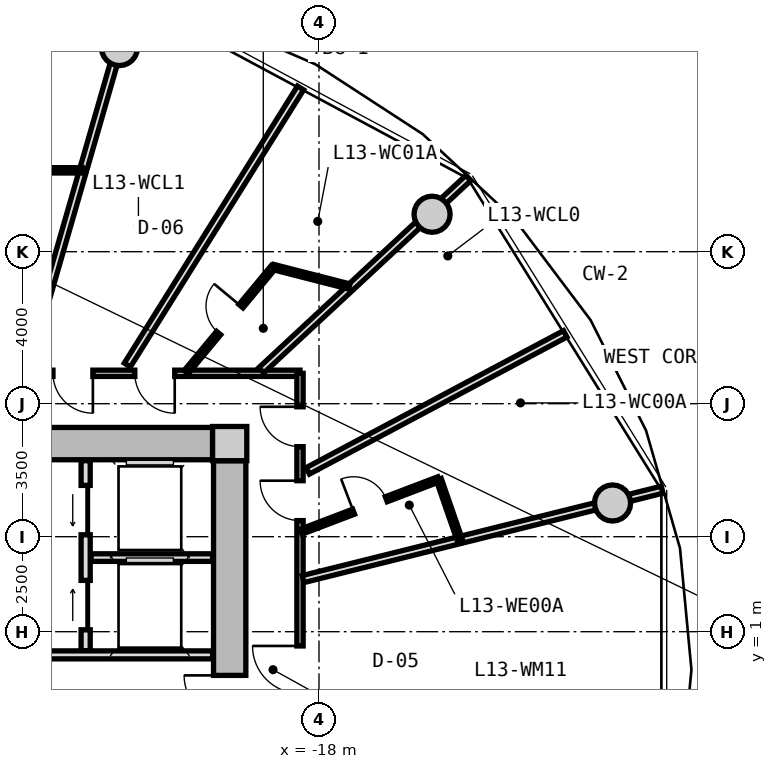
"""IFC4 building model, lengths in metres.
Left out: names, types, materials, properties, quantities, classifications, styles, units other than length and angle.
Written with IfcOpenShell. Run it as: python <this file> out.ifc"""

import sys

from ifc_helpers import new_model, si_unit, direction, frame, frame_2d, origin, origin_2d, place, context, subcontext, project, spatial, rectangle, circle, extrude, source, transform, mapped, element, fill, save


model = new_model("IFC4")
c1 = context("Model", 3, precision=1e-05, world=origin(), true_north=direction((0.0, 1.0)))
c2 = subcontext(c1, "Body", "Model", "MODEL_VIEW")
j1 = project(units=[si_unit("LENGTHUNIT", "METRE"), si_unit("PLANEANGLEUNIT", "RADIAN")], contexts=[c1])
p1 = place(None, origin())
s1 = spatial("IfcSite", under=j1, at=p1, CompositionType="ELEMENT")
p2 = place(p1, origin())
s2 = spatial("IfcBuilding", under=s1, at=p2, CompositionType="ELEMENT")
p3 = place(p2, frame((0.0, 0.0, 46.0)))
s3 = spatial("IfcBuildingStorey", under=s2, at=p3, CompositionType="ELEMENT", Elevation=46.0)
m1 = source(origin(), c2, "Body", "SweptSolid", [
    extrude(rectangle(XDim=0.9, YDim=0.9, at=origin_2d()), origin(), (0.0, 0.0, 1.0), 3.05),
])
p4 = place(p3, frame((-20.35, 5.95, 0.0), z_axis=(0.0, 0.0, 1.0), x_axis=(1.0, 0.0, 0.0)))
e1 = element("IfcColumn", 1, at=p4, inside=s3, PredefinedType="COLUMN", context=c2, shape_type="MappedRepresentation", body=[
    mapped(m1, transform((0.0, 0.0, 0.0), x_axis=(1.0, 0.0, 0.0), y_axis=(0.0, 1.0, 0.0), z_axis=(0.0, 0.0, 1.0), scale=1.0)),
])
m2 = source(origin(), c2, "Body", "SweptSolid", [
    extrude(rectangle(XDim=14.4, YDim=0.85, at=frame_2d((7.2, 0.0))), origin(), (0.0, 0.0, 1.0), 2.79),
])
p5 = place(p3, frame((-35.2, 5.95, 0.0), z_axis=(0.0, 0.0, 1.0), x_axis=(1.0, 0.0, 0.0)))
e2 = element("IfcWall", 2, at=p5, inside=s3, PredefinedType="SHEAR", context=c2, shape_type="MappedRepresentation", body=[
    mapped(m2, transform((0.0, 0.0, 0.0), x_axis=(1.0, 0.0, 0.0), y_axis=(0.0, 1.0, 0.0), z_axis=(0.0, 0.0, 1.0), scale=1.0)),
])
m3 = source(origin(), c2, "Body", "SweptSolid", [
    extrude(rectangle(XDim=11.0, YDim=0.85, at=frame_2d((5.5, 0.0))), origin(), (0.0, 0.0, 1.0), 2.79),
])
p6 = place(p3, frame((-20.35, 5.5, 0.0), z_axis=(0.0, 0.0, 1.0), x_axis=(0.0, -1.0, 0.0)))
e3 = element("IfcWall", 3, at=p6, inside=s3, PredefinedType="SHEAR", context=c2, shape_type="MappedRepresentation", body=[
    mapped(m3, transform((0.0, 0.0, 0.0), x_axis=(1.0, 0.0, 0.0), y_axis=(0.0, 1.0, 0.0), z_axis=(0.0, 0.0, 1.0), scale=1.0)),
])
p7 = place(p6, frame((5.65, 0.0, 0.0)))
e4 = element("IfcOpeningElement", 4, at=p7, cuts=e3, PredefinedType="OPENING", context=c2, shape_type="SweptSolid", body=[
    extrude(rectangle(XDim=1.2, YDim=2.15, at=frame_2d((0.6, 1.075))), frame((0.0, 0.435, 0.0), z_axis=(0.0, -1.0, 0.0), x_axis=(1.0, 0.0, 0.0)), (0.0, 0.0, 1.0), 0.87),
])
m4 = source(origin(), c2, "Body", "SweptSolid", [
    extrude(circle(Radius=0.475, at=origin_2d()), origin(), (0.0, 0.0, 1.0), 3.05),
])
for number, where, z_axis, x_axis in (
    (5, (-10.275, 4.387, 0.0), (0.0, 0.0, 1.0), (1.0, 0.0, 0.0)),
    (6, (-15.025, 11.985, 0.0), (0.0, 0.0, 1.0), (1.0, 0.0, 0.0)),
    (7, (-23.251, 16.373, 0.0), (0.0, 0.0, 1.0), (1.0, 0.0, 0.0)),
):
    element("IfcColumn", number, at=place(p3, frame(where, z_axis=z_axis, x_axis=x_axis)), inside=s3, PredefinedType="COLUMN", context=c2, shape_type="MappedRepresentation", body=[
        mapped(m4, transform((0.0, 0.0, 0.0), x_axis=(1.0, 0.0, 0.0), y_axis=(0.0, 1.0, 0.0), z_axis=(0.0, 0.0, 1.0), scale=1.0)),
    ])
m5 = source(origin(), c2, "Body", "SweptSolid", [
    extrude(rectangle(XDim=5.0, YDim=0.24, at=frame_2d((2.5, 0.0))), origin(), (0.0, 0.0, 1.0), 2.775),
])
p8 = place(p3, frame((-24.14, 0.5, 0.0), z_axis=(0.0, 0.0, 1.0), x_axis=(0.0, 1.0, 0.0)))
e8 = element("IfcWall", 8, at=p8, inside=s3, PredefinedType="PARTITIONING", context=c2, shape_type="MappedRepresentation", body=[
    mapped(m5, transform((0.0, 0.0, 0.0), x_axis=(1.0, 0.0, 0.0), y_axis=(0.0, 1.0, 0.0), z_axis=(0.0, 0.0, 1.0), scale=1.0)),
])
p9 = place(p8, frame((3.05, 0.0, 0.0)))
e9 = element("IfcOpeningElement", 9, at=p9, cuts=e8, PredefinedType="OPENING", context=c2, shape_type="SweptSolid", body=[
    extrude(rectangle(XDim=1.3, YDim=2.2, at=frame_2d((0.65, 1.1))), frame((0.0, 0.13, 0.0), z_axis=(0.0, -1.0, 0.0), x_axis=(1.0, 0.0, 0.0)), (0.0, 0.0, 1.0), 0.26),
])
p10 = place(p8, frame((0.55, 0.0, 0.0)))
e10 = element("IfcOpeningElement", 10, at=p10, cuts=e8, PredefinedType="OPENING", context=c2, shape_type="SweptSolid", body=[
    extrude(rectangle(XDim=1.3, YDim=2.2, at=frame_2d((0.65, 1.1))), frame((0.0, 0.13, 0.0), z_axis=(0.0, -1.0, 0.0), x_axis=(1.0, 0.0, 0.0)), (0.0, 0.0, 1.0), 0.26),
])
m6 = source(origin(), c2, "Body", "SweptSolid", [
    extrude(rectangle(XDim=3.2, YDim=0.2, at=frame_2d((1.6, 0.0))), origin(), (0.0, 0.0, 1.0), 2.775),
])
p11 = place(p3, frame((-24.0, 2.95, 0.0), z_axis=(0.0, 0.0, 1.0), x_axis=(1.0, 0.0, 0.0)))
e11 = element("IfcWall", 11, at=p11, inside=s3, PredefinedType="PARTITIONING", context=c2, shape_type="MappedRepresentation", body=[
    mapped(m6, transform((0.0, 0.0, 0.0), x_axis=(1.0, 0.0, 0.0), y_axis=(0.0, 1.0, 0.0), z_axis=(0.0, 0.0, 1.0), scale=1.0)),
])
m7 = source(origin(), c2, "Body", "SweptSolid", [
    extrude(rectangle(XDim=6.66, YDim=0.21, at=frame_2d((3.33, 0.0))), origin(), (0.0, 0.0, 1.0), 2.775),
])
p12 = place(p3, frame((-27.46, 0.39, 0.0), z_axis=(0.0, 0.0, 1.0), x_axis=(1.0, 0.0, 0.0)))
e12 = element("IfcWall", 12, at=p12, inside=s3, PredefinedType="PARTITIONING", context=c2, shape_type="MappedRepresentation", body=[
    mapped(m7, transform((0.0, 0.0, 0.0), x_axis=(1.0, 0.0, 0.0), y_axis=(0.0, 1.0, 0.0), z_axis=(0.0, 0.0, 1.0), scale=1.0)),
])
p13 = place(p12, frame((1.0, 0.0, 0.0)))
e13 = element("IfcOpeningElement", 13, at=p13, cuts=e12, PredefinedType="OPENING", context=c2, shape_type="SweptSolid", body=[
    extrude(rectangle(XDim=1.2, YDim=2.15, at=frame_2d((0.6, 1.075))), frame((0.0, 0.115, 0.0), z_axis=(0.0, -1.0, 0.0), x_axis=(1.0, 0.0, 0.0)), (0.0, 0.0, 1.0), 0.23),
])
m8 = source(origin(), c2, "Body", "SweptSolid", [
    extrude(rectangle(XDim=19.0, YDim=0.165, at=frame_2d((9.5, 0.0))), origin(), (0.0, 0.0, 1.0), 2.775),
])
p14 = place(p3, frame((-37.5, 7.8, 0.0), z_axis=(0.0, 0.0, 1.0), x_axis=(1.0, 0.0, 0.0)))
e14 = element("IfcWall", 14, at=p14, inside=s3, PredefinedType="PARTITIONING", context=c2, shape_type="MappedRepresentation", body=[
    mapped(m8, transform((0.0, 0.0, 0.0), x_axis=(1.0, 0.0, 0.0), y_axis=(0.0, 1.0, 0.0), z_axis=(0.0, 0.0, 1.0), scale=1.0)),
])
p15 = place(p14, frame((4.773, 0.0, 0.0)))
e15 = element("IfcOpeningElement", 15, at=p15, cuts=e14, PredefinedType="OPENING", context=c2, shape_type="SweptSolid", body=[
    extrude(rectangle(XDim=1.05, YDim=2.15, at=frame_2d((0.525, 1.075))), frame((0.0, 0.093, 0.0), z_axis=(0.0, -1.0, 0.0), x_axis=(1.0, 0.0, 0.0)), (0.0, 0.0, 1.0), 0.185),
])
p16 = place(p14, frame((2.251, 0.0, 0.0)))
e16 = element("IfcOpeningElement", 16, at=p16, cuts=e14, PredefinedType="OPENING", context=c2, shape_type="SweptSolid", body=[
    extrude(rectangle(XDim=1.05, YDim=2.15, at=frame_2d((0.525, 1.075))), frame((0.0, 0.093, 0.0), z_axis=(0.0, -1.0, 0.0), x_axis=(1.0, 0.0, 0.0)), (0.0, 0.0, 1.0), 0.185),
])
p17 = place(p14, frame((14.653, 0.0, 0.0)))
e17 = element("IfcOpeningElement", 17, at=p17, cuts=e14, PredefinedType="OPENING", context=c2, shape_type="SweptSolid", body=[
    extrude(rectangle(XDim=1.05, YDim=2.15, at=frame_2d((0.525, 1.075))), frame((0.0, 0.093, 0.0), z_axis=(0.0, -1.0, 0.0), x_axis=(1.0, 0.0, 0.0)), (0.0, 0.0, 1.0), 0.185),
])
p18 = place(p14, frame((12.5, 0.0, 0.0)))
e18 = element("IfcOpeningElement", 18, at=p18, cuts=e14, PredefinedType="OPENING", context=c2, shape_type="SweptSolid", body=[
    extrude(rectangle(XDim=1.05, YDim=2.15, at=frame_2d((0.525, 1.075))), frame((0.0, 0.093, 0.0), z_axis=(0.0, -1.0, 0.0), x_axis=(1.0, 0.0, 0.0)), (0.0, 0.0, 1.0), 0.185),
])
p19 = place(p14, frame((9.352, 0.0, 0.0)))
e19 = element("IfcOpeningElement", 19, at=p19, cuts=e14, PredefinedType="OPENING", context=c2, shape_type="SweptSolid", body=[
    extrude(rectangle(XDim=1.05, YDim=2.15, at=frame_2d((0.525, 1.075))), frame((0.0, 0.093, 0.0), z_axis=(0.0, -1.0, 0.0), x_axis=(1.0, 0.0, 0.0)), (0.0, 0.0, 1.0), 0.185),
])
p20 = place(p14, frame((7.806, 0.0, 0.0)))
e20 = element("IfcOpeningElement", 20, at=p20, cuts=e14, PredefinedType="OPENING", context=c2, shape_type="SweptSolid", body=[
    extrude(rectangle(XDim=1.05, YDim=2.15, at=frame_2d((0.525, 1.075))), frame((0.0, 0.093, 0.0), z_axis=(0.0, -1.0, 0.0), x_axis=(1.0, 0.0, 0.0)), (0.0, 0.0, 1.0), 0.185),
])
m9 = source(origin(), c2, "Body", "SweptSolid", [
    extrude(rectangle(XDim=15.6, YDim=0.165, at=frame_2d((7.8, 0.0))), origin(), (0.0, 0.0, 1.0), 2.775),
])
p21 = place(p3, frame((-18.5, 7.8, 0.0), z_axis=(0.0, 0.0, 1.0), x_axis=(0.0, -1.0, 0.0)))
e21 = element("IfcWall", 21, at=p21, inside=s3, PredefinedType="PARTITIONING", context=c2, shape_type="MappedRepresentation", body=[
    mapped(m9, transform((0.0, 0.0, 0.0), x_axis=(1.0, 0.0, 0.0), y_axis=(0.0, 1.0, 0.0), z_axis=(0.0, 0.0, 1.0), scale=1.0)),
])
p22 = place(p21, frame((12.141, 0.0, 0.0)))
e22 = element("IfcOpeningElement", 22, at=p22, cuts=e21, PredefinedType="OPENING", context=c2, shape_type="SweptSolid", body=[
    extrude(rectangle(XDim=1.25, YDim=2.2, at=frame_2d((0.625, 1.1))), frame((0.0, 0.093, 0.0), z_axis=(0.0, -1.0, 0.0), x_axis=(1.0, 0.0, 0.0)), (0.0, 0.0, 1.0), 0.185),
])
p23 = place(p21, frame((7.175, 0.0, 0.0)))
e23 = element("IfcOpeningElement", 23, at=p23, cuts=e21, PredefinedType="OPENING", context=c2, shape_type="SweptSolid", body=[
    extrude(rectangle(XDim=1.25, YDim=2.2, at=frame_2d((0.625, 1.1))), frame((0.0, 0.093, 0.0), z_axis=(0.0, -1.0, 0.0), x_axis=(1.0, 0.0, 0.0)), (0.0, 0.0, 1.0), 0.185),
])
p24 = place(p21, frame((2.826, 0.0, 0.0)))
e24 = element("IfcOpeningElement", 24, at=p24, cuts=e21, PredefinedType="OPENING", context=c2, shape_type="SweptSolid", body=[
    extrude(rectangle(XDim=1.05, YDim=2.15, at=frame_2d((0.525, 1.075))), frame((0.0, 0.093, 0.0), z_axis=(0.0, -1.0, 0.0), x_axis=(1.0, 0.0, 0.0)), (0.0, 0.0, 1.0), 0.185),
])
p25 = place(p21, frame((0.881, 0.0, 0.0)))
e25 = element("IfcOpeningElement", 25, at=p25, cuts=e21, PredefinedType="OPENING", context=c2, shape_type="SweptSolid", body=[
    extrude(rectangle(XDim=1.05, YDim=2.15, at=frame_2d((0.525, 1.075))), frame((0.0, 0.093, 0.0), z_axis=(0.0, -1.0, 0.0), x_axis=(1.0, 0.0, 0.0)), (0.0, 0.0, 1.0), 0.185),
])
m10 = source(origin(), c2, "Body", "SweptSolid", [
    extrude(rectangle(XDim=9.737, YDim=0.19, at=frame_2d((4.869, 0.0))), origin(), (0.0, 0.0, 1.0), 2.225),
])
p26 = place(p3, frame((-18.42, 2.385, 0.0), z_axis=(0.0, 0.0, 1.0), x_axis=(0.970392716238, 0.241532557375, 0.0)))
e26 = element("IfcWall", 26, at=p26, inside=s3, PredefinedType="PARTITIONING", context=c2, shape_type="MappedRepresentation", body=[
    mapped(m10, transform((0.0, 0.0, 0.0), x_axis=(1.0, 0.0, 0.0), y_axis=(0.0, 1.0, 0.0), z_axis=(0.0, 0.0, 1.0), scale=1.0)),
])
m11 = source(origin(), c2, "Body", "SweptSolid", [
    extrude(rectangle(XDim=7.435, YDim=0.19, at=frame_2d((3.717, 0.0))), origin(), (0.0, 0.0, 1.0), 2.225),
])
p27 = place(p3, frame((-19.517, 7.88, 0.0), z_axis=(0.0, 0.0, 1.0), x_axis=(0.732651956848, 0.680603489652, 0.0)))
e27 = element("IfcWall", 27, at=p27, inside=s3, PredefinedType="PARTITIONING", context=c2, shape_type="MappedRepresentation", body=[
    mapped(m11, transform((0.0, 0.0, 0.0), x_axis=(1.0, 0.0, 0.0), y_axis=(0.0, 1.0, 0.0), z_axis=(0.0, 0.0, 1.0), scale=1.0)),
])
m12 = source(origin(), c2, "Body", "SweptSolid", [
    extrude(rectangle(XDim=7.677, YDim=0.19, at=frame_2d((3.838, 0.0))), origin(), (0.0, 0.0, 1.0), 2.775),
])
p28 = place(p3, frame((-18.297, 5.231, 0.0), z_axis=(0.0, 0.0, 1.0), x_axis=(0.882725057546, 0.469889851753, 0.0)))
e28 = element("IfcWall", 28, at=p28, inside=s3, PredefinedType="PARTITIONING", context=c2, shape_type="MappedRepresentation", body=[
    mapped(m12, transform((0.0, 0.0, 0.0), x_axis=(1.0, 0.0, 0.0), y_axis=(0.0, 1.0, 0.0), z_axis=(0.0, 0.0, 1.0), scale=1.0)),
])
m13 = source(origin(), c2, "Body", "SweptSolid", [
    extrude(rectangle(XDim=3.874, YDim=0.14, at=frame_2d((1.937, 0.0))), origin(), (0.0, 0.0, 1.0), 2.775),
])
p29 = place(p3, frame((-18.47, 3.632, 0.0), z_axis=(0.0, 0.0, 1.0), x_axis=(0.934461775659, 0.35606346321, 0.0)))
e29 = element("IfcWall", 29, at=p29, inside=s3, PredefinedType="PARTITIONING", context=c2, shape_type="MappedRepresentation", body=[
    mapped(m13, transform((0.0, 0.0, 0.0), x_axis=(1.0, 0.0, 0.0), y_axis=(0.0, 1.0, 0.0), z_axis=(0.0, 0.0, 1.0), scale=1.0)),
])
p30 = place(p29, frame((1.477, 0.0, 0.0)))
e30 = element("IfcOpeningElement", 30, at=p30, cuts=e29, PredefinedType="OPENING", context=c2, shape_type="SweptSolid", body=[
    extrude(rectangle(XDim=0.92, YDim=2.1, at=frame_2d((0.46, 1.05))), frame((0.0, 0.08, 0.0), z_axis=(0.0, -1.0, 0.0), x_axis=(1.0, 0.0, 0.0)), (0.0, 0.0, 1.0), 0.16),
])
m14 = source(origin(), c2, "Body", "SweptSolid", [
    extrude(rectangle(XDim=1.676, YDim=0.14, at=frame_2d((0.838, 0.0))), origin(), (0.0, 0.0, 1.0), 2.775),
])
p31 = place(p3, frame((-14.85, 5.011, 0.0), z_axis=(0.0, 0.0, 1.0), x_axis=(0.327785970556, -0.944752008469, 0.0)))
e31 = element("IfcWall", 31, at=p31, inside=s3, PredefinedType="PARTITIONING", context=c2, shape_type="MappedRepresentation", body=[
    mapped(m14, transform((0.0, 0.0, 0.0), x_axis=(1.0, 0.0, 0.0), y_axis=(0.0, 1.0, 0.0), z_axis=(0.0, 0.0, 1.0), scale=1.0)),
])
m15 = source(origin(), c2, "Body", "SweptSolid", [
    extrude(rectangle(XDim=10.196, YDim=0.19, at=frame_2d((5.098, 0.0))), origin(), (0.0, 0.0, 1.0), 2.225),
])
p32 = place(p3, frame((-25.727, 7.88, 0.0), z_axis=(0.0, 0.0, 1.0), x_axis=(0.277136420347, 0.960830580549, 0.0)))
e32 = element("IfcWall", 32, at=p32, inside=s3, PredefinedType="PARTITIONING", context=c2, shape_type="MappedRepresentation", body=[
    mapped(m15, transform((0.0, 0.0, 0.0), x_axis=(1.0, 0.0, 0.0), y_axis=(0.0, 1.0, 0.0), z_axis=(0.0, 0.0, 1.0), scale=1.0)),
])
m16 = source(origin(), c2, "Body", "SweptSolid", [
    extrude(rectangle(XDim=8.598, YDim=0.19, at=frame_2d((4.299, 0.0))), origin(), (0.0, 0.0, 1.0), 2.775),
])
p33 = place(p3, frame((-23.043, 8.017, 0.0), z_axis=(0.0, 0.0, 1.0), x_axis=(0.530039776395, 0.847972779893, 0.0)))
e33 = element("IfcWall", 33, at=p33, inside=s3, PredefinedType="PARTITIONING", context=c2, shape_type="MappedRepresentation", body=[
    mapped(m16, transform((0.0, 0.0, 0.0), x_axis=(1.0, 0.0, 0.0), y_axis=(0.0, 1.0, 0.0), z_axis=(0.0, 0.0, 1.0), scale=1.0)),
])
m17 = source(origin(), c2, "Body", "SweptSolid", [
    extrude(rectangle(XDim=3.594, YDim=0.14, at=frame_2d((1.797, 0.0))), origin(), (0.0, 0.0, 1.0), 2.775),
])
p34 = place(p3, frame((-21.496, 7.83, 0.0), z_axis=(0.0, 0.0, 1.0), x_axis=(0.639001147083, 0.769205781326, 0.0)))
e34 = element("IfcWall", 34, at=p34, inside=s3, PredefinedType="PARTITIONING", context=c2, shape_type="MappedRepresentation", body=[
    mapped(m17, transform((0.0, 0.0, 0.0), x_axis=(1.0, 0.0, 0.0), y_axis=(0.0, 1.0, 0.0), z_axis=(0.0, 0.0, 1.0), scale=1.0)),
])
p35 = place(p34, frame((1.337, 0.0, 0.0)))
e35 = element("IfcOpeningElement", 35, at=p35, cuts=e34, PredefinedType="OPENING", context=c2, shape_type="SweptSolid", body=[
    extrude(rectangle(XDim=0.92, YDim=2.1, at=frame_2d((0.46, 1.05))), frame((0.0, 0.08, 0.0), z_axis=(0.0, -1.0, 0.0), x_axis=(1.0, 0.0, 0.0)), (0.0, 0.0, 1.0), 0.16),
])
m18 = source(origin(), c2, "Body", "SweptSolid", [
    extrude(rectangle(XDim=2.062, YDim=0.14, at=frame_2d((1.031, 0.0))), origin(), (0.0, 0.0, 1.0), 2.415),
])
p36 = place(p3, frame((-19.199, 10.595, 0.0), z_axis=(0.0, 0.0, 1.0), x_axis=(0.968776253543, -0.247936626121, 0.0)))
e36 = element("IfcWall", 36, at=p36, inside=s3, PredefinedType="PARTITIONING", context=c2, shape_type="MappedRepresentation", body=[
    mapped(m18, transform((0.0, 0.0, 0.0), x_axis=(1.0, 0.0, 0.0), y_axis=(0.0, 1.0, 0.0), z_axis=(0.0, 0.0, 1.0), scale=1.0)),
])
m19 = source(origin(), c2, "Body", "SweptSolid", [
    extrude(rectangle(XDim=1.843, YDim=0.14, at=frame_2d((0.921, 0.0))), origin(), (0.0, 0.0, 1.0), 2.775),
])
p37 = place(p3, frame((-26.072, 13.143, 0.0), z_axis=(0.0, 0.0, 1.0), x_axis=(0.999998937801, -0.001457531246, 0.0)))
e37 = element("IfcWall", 37, at=p37, inside=s3, PredefinedType="PARTITIONING", context=c2, shape_type="MappedRepresentation", body=[
    mapped(m19, transform((0.0, 0.0, 0.0), x_axis=(1.0, 0.0, 0.0), y_axis=(0.0, 1.0, 0.0), z_axis=(0.0, 0.0, 1.0), scale=1.0)),
])
m20 = source(origin(), c2, "Body", "SweptSolid", [
    extrude(rectangle(XDim=1.3, YDim=2.2, at=frame_2d((0.65, 1.1))), frame((0.0, 0.025, 0.0), z_axis=(0.0, -1.0, 0.0), x_axis=(1.0, 0.0, 0.0)), (0.0, 0.0, 1.0), 0.05),
])
p38 = place(p9, origin())
e38 = element("IfcDoor", 38, at=p38, inside=s3, OperationType="SLIDING_TO_LEFT", PredefinedType="DOOR", context=c2, shape_type="MappedRepresentation", body=[
    mapped(m20, transform((0.0, 0.0, 0.0), x_axis=(1.0, 0.0, 0.0), y_axis=(0.0, 1.0, 0.0), z_axis=(0.0, 0.0, 1.0), scale=1.0)),
])
fill(e9, e38)
p39 = place(p10, origin())
e39 = element("IfcDoor", 39, at=p39, inside=s3, OperationType="SLIDING_TO_RIGHT", PredefinedType="DOOR", context=c2, shape_type="MappedRepresentation", body=[
    mapped(m20, transform((0.0, 0.0, 0.0), x_axis=(1.0, 0.0, 0.0), y_axis=(0.0, 1.0, 0.0), z_axis=(0.0, 0.0, 1.0), scale=1.0)),
])
fill(e10, e39)
m21 = source(origin(), c2, "Body", "SweptSolid", [
    extrude(rectangle(XDim=1.2, YDim=2.15, at=frame_2d((0.6, 1.075))), frame((0.0, 0.025, 0.0), z_axis=(0.0, -1.0, 0.0), x_axis=(1.0, 0.0, 0.0)), (0.0, 0.0, 1.0), 0.05),
])
p40 = place(p7, frame((1.2, 0.0, 0.0), z_axis=(0.0, 0.0, 1.0), x_axis=(-1.0, 0.0, 0.0)))
e40 = element("IfcDoor", 40, at=p40, inside=s3, OperationType="SINGLE_SWING_RIGHT", PredefinedType="DOOR", context=c2, shape_type="MappedRepresentation", body=[
    mapped(m21, transform((0.0, 0.0, 0.0), x_axis=(1.0, 0.0, 0.0), y_axis=(0.0, 1.0, 0.0), z_axis=(0.0, 0.0, 1.0), scale=1.0)),
])
fill(e4, e40)
m22 = source(origin(), c2, "Body", "SweptSolid", [
    extrude(rectangle(XDim=1.25, YDim=2.2, at=frame_2d((0.625, 1.1))), frame((0.0, 0.025, 0.0), z_axis=(0.0, -1.0, 0.0), x_axis=(1.0, 0.0, 0.0)), (0.0, 0.0, 1.0), 0.05),
])
p41 = place(p23, frame((1.25, 0.0, 0.0), z_axis=(0.0, 0.0, 1.0), x_axis=(-1.0, 0.0, 0.0)))
e41 = element("IfcDoor", 41, at=p41, inside=s3, OperationType="SINGLE_SWING_RIGHT", PredefinedType="DOOR", context=c2, shape_type="MappedRepresentation", body=[
    mapped(m22, transform((0.0, 0.0, 0.0), x_axis=(1.0, 0.0, 0.0), y_axis=(0.0, 1.0, 0.0), z_axis=(0.0, 0.0, 1.0), scale=1.0)),
])
fill(e23, e41)
m23 = source(origin(), c2, "Body", "SweptSolid", [
    extrude(rectangle(XDim=1.05, YDim=2.15, at=frame_2d((0.525, 1.075))), frame((0.0, 0.025, 0.0), z_axis=(0.0, -1.0, 0.0), x_axis=(1.0, 0.0, 0.0)), (0.0, 0.0, 1.0), 0.05),
])
p42 = place(p24, frame((1.05, 0.0, 0.0), z_axis=(0.0, 0.0, 1.0), x_axis=(-1.0, 0.0, 0.0)))
e42 = element("IfcDoor", 42, at=p42, inside=s3, OperationType="SINGLE_SWING_RIGHT", PredefinedType="DOOR", context=c2, shape_type="MappedRepresentation", body=[
    mapped(m23, transform((0.0, 0.0, 0.0), x_axis=(1.0, 0.0, 0.0), y_axis=(0.0, 1.0, 0.0), z_axis=(0.0, 0.0, 1.0), scale=1.0)),
])
fill(e24, e42)
m24 = source(origin(), c2, "Body", "SweptSolid", [
    extrude(rectangle(XDim=0.92, YDim=2.1, at=frame_2d((0.46, 1.05))), frame((0.0, 0.025, 0.0), z_axis=(0.0, -1.0, 0.0), x_axis=(1.0, 0.0, 0.0)), (0.0, 0.0, 1.0), 0.05),
])
p43 = place(p30, origin())
e43 = element("IfcDoor", 43, at=p43, inside=s3, OperationType="SINGLE_SWING_LEFT", PredefinedType="DOOR", context=c2, shape_type="MappedRepresentation", body=[
    mapped(m24, transform((0.0, 0.0, 0.0), x_axis=(1.0, 0.0, 0.0), y_axis=(0.0, 1.0, 0.0), z_axis=(0.0, 0.0, 1.0), scale=1.0)),
])
fill(e30, e43)
p44 = place(p25, frame((1.05, 0.0, 0.0), z_axis=(0.0, 0.0, 1.0), x_axis=(-1.0, 0.0, 0.0)))
e44 = element("IfcDoor", 44, at=p44, inside=s3, OperationType="SINGLE_SWING_RIGHT", PredefinedType="DOOR", context=c2, shape_type="MappedRepresentation", body=[
    mapped(m23, transform((0.0, 0.0, 0.0), x_axis=(1.0, 0.0, 0.0), y_axis=(0.0, 1.0, 0.0), z_axis=(0.0, 0.0, 1.0), scale=1.0)),
])
fill(e25, e44)
p45 = place(p17, frame((1.05, 0.0, 0.0), z_axis=(0.0, 0.0, 1.0), x_axis=(-1.0, 0.0, 0.0)))
e45 = element("IfcDoor", 45, at=p45, inside=s3, OperationType="SINGLE_SWING_LEFT", PredefinedType="DOOR", context=c2, shape_type="MappedRepresentation", body=[
    mapped(m23, transform((0.0, 0.0, 0.0), x_axis=(1.0, 0.0, 0.0), y_axis=(0.0, 1.0, 0.0), z_axis=(0.0, 0.0, 1.0), scale=1.0)),
])
fill(e17, e45)
p46 = place(p35, origin())
e46 = element("IfcDoor", 46, at=p46, inside=s3, OperationType="SINGLE_SWING_RIGHT", PredefinedType="DOOR", context=c2, shape_type="MappedRepresentation", body=[
    mapped(m24, transform((0.0, 0.0, 0.0), x_axis=(1.0, 0.0, 0.0), y_axis=(0.0, 1.0, 0.0), z_axis=(0.0, 0.0, 1.0), scale=1.0)),
])
fill(e35, e46)
p47 = place(p18, frame((1.05, 0.0, 0.0), z_axis=(0.0, 0.0, 1.0), x_axis=(-1.0, 0.0, 0.0)))
e47 = element("IfcDoor", 47, at=p47, inside=s3, OperationType="SINGLE_SWING_LEFT", PredefinedType="DOOR", context=c2, shape_type="MappedRepresentation", body=[
    mapped(m23, transform((0.0, 0.0, 0.0), x_axis=(1.0, 0.0, 0.0), y_axis=(0.0, 1.0, 0.0), z_axis=(0.0, 0.0, 1.0), scale=1.0)),
])
fill(e18, e47)
save(model, sys.argv[1])
